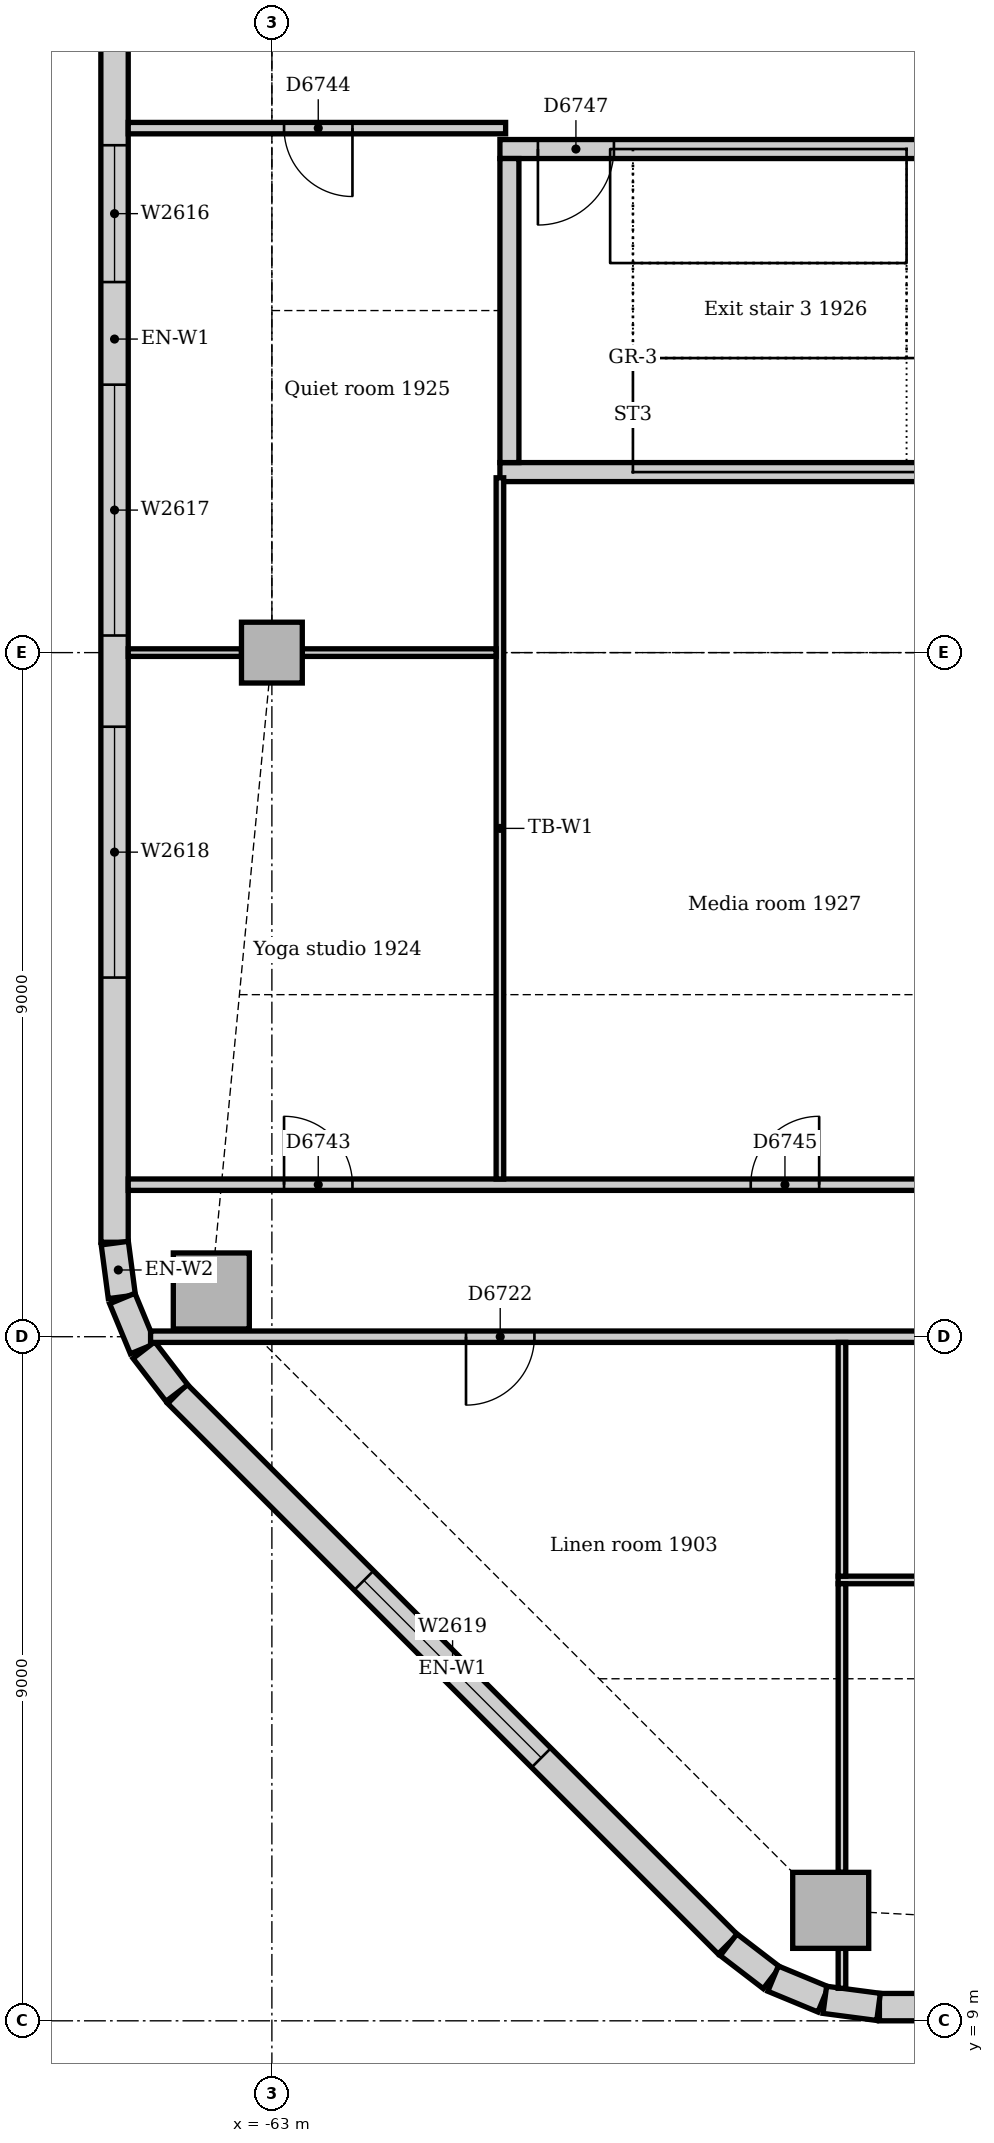
"""IFC4 building model, lengths in metres.
Left out: names, types, materials, properties, quantities, classifications, styles, units other than length and angle.
Written with IfcOpenShell. Run it as: python <this file> out.ifc"""

import sys

from ifc_helpers import new_model, si_unit, direction, frame, frame_2d, origin, origin_2d, place, context, subcontext, project, spatial, rectangle, extrude, element, fill, save


model = new_model("IFC4")
c1 = context("Model", 3, precision=1e-05, world=origin(), true_north=direction((0.0, 1.0)))
c2 = subcontext(c1, "Body", "Model", "MODEL_VIEW")
j1 = project(units=[si_unit("LENGTHUNIT", "METRE"), si_unit("PLANEANGLEUNIT", "RADIAN")], contexts=[c1])
p1 = place(None, origin())
s1 = spatial("IfcSite", under=j1, at=p1, CompositionType="ELEMENT")
p2 = place(p1, origin())
s2 = spatial("IfcBuilding", under=s1, at=p2, CompositionType="ELEMENT")
p3 = place(p2, frame((0.0, 0.0, 83.0)))
s3 = spatial("IfcBuildingStorey", under=s2, at=p3, CompositionType="ELEMENT", Elevation=83.0)
p4 = place(p3, frame((-60.0, 29.375, 0.0), z_axis=(0.0, 0.0, 1.0), x_axis=(1.0, 0.0, 0.0)))
e1 = element("IfcWall", 1, at=p4, inside=s3, PredefinedType="SOLIDWALL", context=c2, shape_type="SweptSolid", body=[
    extrude(rectangle(XDim=7.5, YDim=0.25, at=frame_2d((3.75, 0.0))), origin(), (0.0, 0.0, 1.0), 4.0),
])
p5 = place(p3, frame((-52.5, 33.625, 0.0), z_axis=(0.0, 0.0, 1.0), x_axis=(-1.0, 0.0, 0.0)))
e2 = element("IfcWall", 2, at=p5, inside=s3, PredefinedType="SOLIDWALL", context=c2, shape_type="SweptSolid", body=[
    extrude(rectangle(XDim=7.5, YDim=0.25, at=frame_2d((3.75, 0.0))), origin(), (0.0, 0.0, 1.0), 4.0),
])
p6 = place(p5, frame((6.0, 0.0, 0.0)))
e3 = element("IfcOpeningElement", 3, at=p6, cuts=e2, PredefinedType="OPENING", context=c2, shape_type="SweptSolid", body=[
    extrude(rectangle(XDim=1.0, YDim=2.1, at=frame_2d((0.5, 1.05))), frame((0.0, 0.135, 0.0), z_axis=(0.0, -1.0, 0.0), x_axis=(1.0, 0.0, 0.0)), (0.0, 0.0, 1.0), 0.27),
])
p7 = place(p3, frame((-59.875, 33.5, 0.0), z_axis=(0.0, 0.0, 1.0), x_axis=(0.0, -1.0, 0.0)))
e4 = element("IfcWall", 4, at=p7, inside=s3, PredefinedType="SOLIDWALL", context=c2, shape_type="SweptSolid", body=[
    extrude(rectangle(XDim=4.0, YDim=0.25, at=frame_2d((2.0, 0.0))), origin(), (0.0, 0.0, 1.0), 4.0),
])
for number, where, z_axis, x_axis in (
    (5, (-55.648, 10.453, 0.0), (0.0, 0.0, 1.0), (1.0, 0.0, 0.0)),
    (6, (-63.797, 18.602, 0.0), (0.0, 0.0, 1.0), (1.0, 0.0, 0.0)),
):
    element("IfcColumn", number, at=place(p3, frame(where, z_axis=z_axis, x_axis=x_axis)), inside=s3, PredefinedType="COLUMN", context=c2, shape_type="SweptSolid", body=[
        extrude(rectangle(XDim=1.0, YDim=1.0, at=origin_2d()), origin(), (0.0, 0.0, 1.0), 3.85),
    ])
p8 = place(p3, frame((-63.0, 27.0, 0.0), z_axis=(0.0, 0.0, 1.0), x_axis=(1.0, 0.0, 0.0)))
e7 = element("IfcColumn", 7, at=p8, inside=s3, PredefinedType="COLUMN", context=c2, shape_type="SweptSolid", body=[
    extrude(rectangle(XDim=0.8, YDim=0.8, at=origin_2d()), origin(), (0.0, 0.0, 1.0), 3.85),
])
p9 = place(p3, frame((-55.007, 9.18, 0.0), z_axis=(0.0, 0.0, 1.0), x_axis=(1.0, 0.0, 0.0)))
e8 = element("IfcWall", 8, at=p9, inside=s3, PredefinedType="STANDARD", context=c2, shape_type="SweptSolid", body=[
    extrude(rectangle(XDim=23.765, YDim=0.36, at=frame_2d((11.882, 0.0))), origin(), (0.0, 0.0, 1.0), 3.85),
])
p10 = place(p9, frame((3.482, 0.0, 0.9)))
e9 = element("IfcOpeningElement", 9, at=p10, cuts=e8, PredefinedType="OPENING", context=c2, shape_type="SweptSolid", body=[
    extrude(rectangle(XDim=3.3, YDim=1.6, at=frame_2d((1.65, 0.8))), frame((0.0, 0.19, 0.0), z_axis=(0.0, -1.0, 0.0), x_axis=(1.0, 0.0, 0.0)), (0.0, 0.0, 1.0), 0.38),
])
p11 = place(p9, frame((7.982, 0.0, 0.9)))
e10 = element("IfcOpeningElement", 10, at=p11, cuts=e8, PredefinedType="OPENING", context=c2, shape_type="SweptSolid", body=[
    extrude(rectangle(XDim=3.3, YDim=1.6, at=frame_2d((1.65, 0.8))), frame((0.0, 0.19, 0.0), z_axis=(0.0, -1.0, 0.0), x_axis=(1.0, 0.0, 0.0)), (0.0, 0.0, 1.0), 0.38),
])
p12 = place(p9, frame((12.482, 0.0, 0.9)))
e11 = element("IfcOpeningElement", 11, at=p12, cuts=e8, PredefinedType="OPENING", context=c2, shape_type="SweptSolid", body=[
    extrude(rectangle(XDim=3.3, YDim=1.6, at=frame_2d((1.65, 0.8))), frame((0.0, 0.19, 0.0), z_axis=(0.0, -1.0, 0.0), x_axis=(1.0, 0.0, 0.0)), (0.0, 0.0, 1.0), 0.38),
])
p13 = place(p9, frame((17.732, 0.0, 0.9)))
e12 = element("IfcOpeningElement", 12, at=p13, cuts=e8, PredefinedType="OPENING", context=c2, shape_type="SweptSolid", body=[
    extrude(rectangle(XDim=3.3, YDim=1.6, at=frame_2d((1.65, 0.8))), frame((0.0, 0.19, 0.0), z_axis=(0.0, -1.0, 0.0), x_axis=(1.0, 0.0, 0.0)), (0.0, 0.0, 1.0), 0.38),
])
p14 = place(p3, frame((-65.07, 43.007, 0.0), z_axis=(0.0, 0.0, 1.0), x_axis=(0.0, -1.0, 0.0)))
e13 = element("IfcWall", 13, at=p14, inside=s3, PredefinedType="STANDARD", context=c2, shape_type="SweptSolid", body=[
    extrude(rectangle(XDim=23.765, YDim=0.36, at=frame_2d((11.882, 0.0))), origin(), (0.0, 0.0, 1.0), 3.85),
])
p15 = place(p14, frame((4.232, 0.0, 0.9)))
e14 = element("IfcOpeningElement", 14, at=p15, cuts=e13, PredefinedType="OPENING", context=c2, shape_type="SweptSolid", body=[
    extrude(rectangle(XDim=1.8, YDim=1.6, at=frame_2d((0.9, 0.8))), frame((0.0, 0.19, 0.0), z_axis=(0.0, -1.0, 0.0), x_axis=(1.0, 0.0, 0.0)), (0.0, 0.0, 1.0), 0.38),
])
p16 = place(p14, frame((9.332, 0.0, 0.9)))
e15 = element("IfcOpeningElement", 15, at=p16, cuts=e13, PredefinedType="OPENING", context=c2, shape_type="SweptSolid", body=[
    extrude(rectangle(XDim=1.8, YDim=1.6, at=frame_2d((0.9, 0.8))), frame((0.0, 0.19, 0.0), z_axis=(0.0, -1.0, 0.0), x_axis=(1.0, 0.0, 0.0)), (0.0, 0.0, 1.0), 0.38),
])
p17 = place(p14, frame((12.482, 0.0, 0.9)))
e16 = element("IfcOpeningElement", 16, at=p17, cuts=e13, PredefinedType="OPENING", context=c2, shape_type="SweptSolid", body=[
    extrude(rectangle(XDim=3.3, YDim=1.6, at=frame_2d((1.65, 0.8))), frame((0.0, 0.19, 0.0), z_axis=(0.0, -1.0, 0.0), x_axis=(1.0, 0.0, 0.0)), (0.0, 0.0, 1.0), 0.38),
])
p18 = place(p14, frame((16.982, 0.0, 0.9)))
e17 = element("IfcOpeningElement", 17, at=p18, cuts=e13, PredefinedType="OPENING", context=c2, shape_type="SweptSolid", body=[
    extrude(rectangle(XDim=3.3, YDim=1.6, at=frame_2d((1.65, 0.8))), frame((0.0, 0.19, 0.0), z_axis=(0.0, -1.0, 0.0), x_axis=(1.0, 0.0, 0.0)), (0.0, 0.0, 1.0), 0.38),
])
p19 = place(p3, frame((-64.244, 17.249, 0.0), z_axis=(0.0, 0.0, 1.0), x_axis=(0.707106781187, -0.707106781187, 0.0)))
e18 = element("IfcWall", 18, at=p19, inside=s3, PredefinedType="STANDARD", context=c2, shape_type="SweptSolid", body=[
    extrude(rectangle(XDim=10.243, YDim=0.36, at=frame_2d((5.121, 0.0))), origin(), (0.0, 0.0, 1.0), 3.85),
])
p20 = place(p19, frame((3.471, 0.0, 0.9)))
e19 = element("IfcOpeningElement", 19, at=p20, cuts=e18, PredefinedType="OPENING", context=c2, shape_type="SweptSolid", body=[
    extrude(rectangle(XDim=3.3, YDim=1.6, at=frame_2d((1.65, 0.8))), frame((0.0, 0.19, 0.0), z_axis=(0.0, -1.0, 0.0), x_axis=(1.0, 0.0, 0.0)), (0.0, 0.0, 1.0), 0.38),
])
for number, where, z_axis, x_axis in (
    (20, (-65.067, 19.231, 0.0), (0.0, 0.0, 1.0), (0.131, -0.991, 0.0)),
    (21, (-64.968, 18.503, 0.0), (0.0, 0.0, 1.0), (0.383, -0.924, 0.0)),
):
    element("IfcWall", number, at=place(p3, frame(where, z_axis=z_axis, x_axis=x_axis)), inside=s3, PredefinedType="STANDARD", context=c2, shape_type="SweptSolid", body=[
        extrude(rectangle(XDim=0.713, YDim=0.36, at=frame_2d((0.356, 0.0))), origin(), (0.0, 0.0, 1.0), 3.85),
    ])
for number, where, z_axis, x_axis in (
    (22, (-64.684, 17.825, 0.0), (0.0, 0.0, 1.0), (0.609, -0.793, 0.0)),
    (23, (-56.991, 10.0, 0.0), (0.0, 0.0, 1.0), (0.793, -0.609, 0.0)),
):
    element("IfcWall", number, at=place(p3, frame(where, z_axis=z_axis, x_axis=x_axis)), inside=s3, PredefinedType="STANDARD", context=c2, shape_type="SweptSolid", body=[
        extrude(rectangle(XDim=0.713, YDim=0.36, at=frame_2d((0.357, 0.0))), origin(), (0.0, 0.0, 1.0), 3.85),
    ])
for number, where, z_axis, x_axis in (
    (24, (-56.406, 9.555, 0.0), (0.0, 0.0, 1.0), (0.924, -0.383, 0.0)),
    (25, (-55.726, 9.276, 0.0), (0.0, 0.0, 1.0), (0.991, -0.131, 0.0)),
):
    element("IfcWall", number, at=place(p3, frame(where, z_axis=z_axis, x_axis=x_axis)), inside=s3, PredefinedType="STANDARD", context=c2, shape_type="SweptSolid", body=[
        extrude(rectangle(XDim=0.713, YDim=0.36, at=frame_2d((0.356, 0.0))), origin(), (0.0, 0.0, 1.0), 3.85),
    ])
p21 = place(p3, frame((-64.596, 18.0, 0.0), z_axis=(0.0, 0.0, 1.0), x_axis=(1.0, 0.0, 0.0)))
e26 = element("IfcWall", 26, at=p21, inside=s3, PredefinedType="PARTITIONING", context=c2, shape_type="SweptSolid", body=[
    extrude(rectangle(XDim=10.246, YDim=0.15, at=frame_2d((5.123, 0.0))), origin(), (0.0, 0.0, 1.0), 3.158),
])
p22 = place(p21, frame((4.15, 0.0, 0.0)))
e27 = element("IfcOpeningElement", 27, at=p22, cuts=e26, PredefinedType="OPENING", context=c2, shape_type="SweptSolid", body=[
    extrude(rectangle(XDim=0.9, YDim=2.1, at=frame_2d((0.45, 1.05))), frame((0.0, 0.085, 0.0), z_axis=(0.0, -1.0, 0.0), x_axis=(1.0, 0.0, 0.0)), (0.0, 0.0, 1.0), 0.17),
])
p23 = place(p3, frame((-64.89, 20.0, 0.0), z_axis=(0.0, 0.0, 1.0), x_axis=(1.0, 0.0, 0.0)))
e28 = element("IfcWall", 28, at=p23, inside=s3, PredefinedType="PARTITIONING", context=c2, shape_type="SweptSolid", body=[
    extrude(rectangle(XDim=19.965, YDim=0.15, at=frame_2d((9.982, 0.0))), origin(), (0.0, 0.0, 1.0), 3.85),
])
p24 = place(p23, frame((2.05, 0.0, 0.0)))
e29 = element("IfcOpeningElement", 29, at=p24, cuts=e28, PredefinedType="OPENING", context=c2, shape_type="SweptSolid", body=[
    extrude(rectangle(XDim=0.9, YDim=2.1, at=frame_2d((0.45, 1.05))), frame((0.0, 0.085, 0.0), z_axis=(0.0, -1.0, 0.0), x_axis=(1.0, 0.0, 0.0)), (0.0, 0.0, 1.0), 0.17),
])
p25 = place(p23, frame((8.19, 0.0, 0.0)))
e30 = element("IfcOpeningElement", 30, at=p25, cuts=e28, PredefinedType="OPENING", context=c2, shape_type="SweptSolid", body=[
    extrude(rectangle(XDim=0.9, YDim=2.1, at=frame_2d((0.45, 1.05))), frame((0.0, 0.085, 0.0), z_axis=(0.0, -1.0, 0.0), x_axis=(1.0, 0.0, 0.0)), (0.0, 0.0, 1.0), 0.17),
])
p26 = place(p3, frame((-64.89, 33.9, 0.0), z_axis=(0.0, 0.0, 1.0), x_axis=(1.0, 0.0, 0.0)))
e31 = element("IfcWall", 31, at=p26, inside=s3, PredefinedType="PARTITIONING", context=c2, shape_type="SweptSolid", body=[
    extrude(rectangle(XDim=4.965, YDim=0.15, at=frame_2d((2.482, 0.0))), origin(), (0.0, 0.0, 1.0), 3.85),
])
p27 = place(p26, frame((2.05, 0.0, 0.0)))
e32 = element("IfcOpeningElement", 32, at=p27, cuts=e31, PredefinedType="OPENING", context=c2, shape_type="SweptSolid", body=[
    extrude(rectangle(XDim=0.9, YDim=2.1, at=frame_2d((0.45, 1.05))), frame((0.0, 0.085, 0.0), z_axis=(0.0, -1.0, 0.0), x_axis=(1.0, 0.0, 0.0)), (0.0, 0.0, 1.0), 0.17),
])
p28 = place(p3, frame((-55.55, 14.8, 0.0), z_axis=(0.0, 0.0, 1.0), x_axis=(1.0, 0.0, 0.0)))
e33 = element("IfcWall", 33, at=p28, inside=s3, PredefinedType="PARTITIONING", context=c2, shape_type="SweptSolid", body=[
    extrude(rectangle(XDim=17.975, YDim=0.1, at=frame_2d((8.988, 0.0))), origin(), (0.0, 0.0, 1.0), 3.85),
])
p29 = place(p28, frame((7.18, 0.0, 0.0)))
e34 = element("IfcOpeningElement", 34, at=p29, cuts=e33, PredefinedType="OPENING", context=c2, shape_type="SweptSolid", body=[
    extrude(rectangle(XDim=0.9, YDim=2.1, at=frame_2d((0.45, 1.05))), frame((0.0, 0.06, 0.0), z_axis=(0.0, -1.0, 0.0), x_axis=(1.0, 0.0, 0.0)), (0.0, 0.0, 1.0), 0.12),
])
p30 = place(p3, frame((-60.0, 20.075, 0.0), z_axis=(0.0, 0.0, 1.0), x_axis=(0.0, 1.0, 0.0)))
e35 = element("IfcWall", 35, at=p30, inside=s3, PredefinedType="PARTITIONING", context=c2, shape_type="SweptSolid", body=[
    extrude(rectangle(XDim=9.225, YDim=0.1, at=frame_2d((4.612, 0.0))), origin(), (0.0, 0.0, 1.0), 3.85),
])
p31 = place(p3, frame((-55.5, 14.85, 0.0), z_axis=(0.0, 0.0, 1.0), x_axis=(0.0, 1.0, 0.0)))
e36 = element("IfcWall", 36, at=p31, inside=s3, PredefinedType="PARTITIONING", context=c2, shape_type="SweptSolid", body=[
    extrude(rectangle(XDim=3.075, YDim=0.1, at=frame_2d((1.538, 0.0))), origin(), (0.0, 0.0, 1.0), 3.85),
])
p32 = place(p3, frame((-55.5, 10.953, 0.0), z_axis=(0.0, 0.0, 1.0), x_axis=(0.0, 1.0, 0.0)))
e37 = element("IfcWall", 37, at=p32, inside=s3, PredefinedType="PARTITIONING", context=c2, shape_type="SweptSolid", body=[
    extrude(rectangle(XDim=3.797, YDim=0.1, at=frame_2d((1.898, 0.0))), origin(), (0.0, 0.0, 1.0), 3.85),
])
p33 = place(p3, frame((-55.5, 9.428, 0.0), z_axis=(0.0, 0.0, 1.0), x_axis=(0.0, 1.0, 0.0)))
e38 = element("IfcWall", 38, at=p33, inside=s3, PredefinedType="PARTITIONING", context=c2, shape_type="SweptSolid", body=[
    extrude(rectangle(XDim=0.525, YDim=0.1, at=frame_2d((0.263, 0.0))), origin(), (0.0, 0.0, 1.0), 3.85),
])
p34 = place(p3, frame((-62.6, 27.0, 0.0), z_axis=(0.0, 0.0, 1.0), x_axis=(1.0, 0.0, 0.0)))
e39 = element("IfcWall", 39, at=p34, inside=s3, PredefinedType="PARTITIONING", context=c2, shape_type="SweptSolid", body=[
    extrude(rectangle(XDim=2.55, YDim=0.1, at=frame_2d((1.275, 0.0))), origin(), (0.0, 0.0, 1.0), 3.158),
])
p35 = place(p3, frame((-64.89, 27.0, 0.0), z_axis=(0.0, 0.0, 1.0), x_axis=(1.0, 0.0, 0.0)))
e40 = element("IfcWall", 40, at=p35, inside=s3, PredefinedType="PARTITIONING", context=c2, shape_type="SweptSolid", body=[
    extrude(rectangle(XDim=1.49, YDim=0.1, at=frame_2d((0.745, 0.0))), origin(), (0.0, 0.0, 1.0), 3.85),
])
p36 = place(p16, origin())
e41 = element("IfcWindow", 41, at=p36, inside=s3, PartitioningType="SINGLE_PANEL", PredefinedType="WINDOW", context=c2, shape_type="SweptSolid", body=[
    extrude(rectangle(XDim=1.8, YDim=1.6, at=frame_2d((0.9, 0.8))), frame((0.0, 0.13, 0.0), z_axis=(0.0, -1.0, 0.0), x_axis=(1.0, 0.0, 0.0)), (0.0, 0.0, 1.0), 0.06),
])
fill(e15, e41)
p37 = place(p17, origin())
e42 = element("IfcWindow", 42, at=p37, inside=s3, PartitioningType="SINGLE_PANEL", PredefinedType="WINDOW", context=c2, shape_type="SweptSolid", body=[
    extrude(rectangle(XDim=3.3, YDim=1.6, at=frame_2d((1.65, 0.8))), frame((0.0, 0.13, 0.0), z_axis=(0.0, -1.0, 0.0), x_axis=(1.0, 0.0, 0.0)), (0.0, 0.0, 1.0), 0.06),
])
fill(e16, e42)
p38 = place(p18, origin())
e43 = element("IfcWindow", 43, at=p38, inside=s3, PartitioningType="SINGLE_PANEL", PredefinedType="WINDOW", context=c2, shape_type="SweptSolid", body=[
    extrude(rectangle(XDim=3.3, YDim=1.6, at=frame_2d((1.65, 0.8))), frame((0.0, 0.13, 0.0), z_axis=(0.0, -1.0, 0.0), x_axis=(1.0, 0.0, 0.0)), (0.0, 0.0, 1.0), 0.06),
])
fill(e17, e43)
p39 = place(p20, origin())
e44 = element("IfcWindow", 44, at=p39, inside=s3, PartitioningType="SINGLE_PANEL", PredefinedType="WINDOW", context=c2, shape_type="SweptSolid", body=[
    extrude(rectangle(XDim=3.3, YDim=1.6, at=frame_2d((1.65, 0.8))), frame((0.0, 0.13, 0.0), z_axis=(0.0, -1.0, 0.0), x_axis=(1.0, 0.0, 0.0)), (0.0, 0.0, 1.0), 0.06),
])
fill(e19, e44)
p40 = place(p22, frame((0.9, 0.0, 0.0), z_axis=(0.0, 0.0, 1.0), x_axis=(-1.0, 0.0, 0.0)))
e45 = element("IfcDoor", 45, at=p40, inside=s3, OperationType="SINGLE_SWING_RIGHT", PredefinedType="DOOR", context=c2, shape_type="SweptSolid", body=[
    extrude(rectangle(XDim=0.9, YDim=2.1, at=frame_2d((0.45, 1.05))), frame((0.0, 0.025, 0.0), z_axis=(0.0, -1.0, 0.0), x_axis=(1.0, 0.0, 0.0)), (0.0, 0.0, 1.0), 0.05),
])
fill(e27, e45)
p41 = place(p24, origin())
e46 = element("IfcDoor", 46, at=p41, inside=s3, OperationType="SINGLE_SWING_LEFT", PredefinedType="DOOR", context=c2, shape_type="SweptSolid", body=[
    extrude(rectangle(XDim=0.9, YDim=2.1, at=frame_2d((0.45, 1.05))), frame((0.0, 0.025, 0.0), z_axis=(0.0, -1.0, 0.0), x_axis=(1.0, 0.0, 0.0)), (0.0, 0.0, 1.0), 0.05),
])
fill(e29, e46)
p42 = place(p27, frame((0.9, 0.0, 0.0), z_axis=(0.0, 0.0, 1.0), x_axis=(-1.0, 0.0, 0.0)))
e47 = element("IfcDoor", 47, at=p42, inside=s3, OperationType="SINGLE_SWING_LEFT", PredefinedType="DOOR", context=c2, shape_type="SweptSolid", body=[
    extrude(rectangle(XDim=0.9, YDim=2.1, at=frame_2d((0.45, 1.05))), frame((0.0, 0.025, 0.0), z_axis=(0.0, -1.0, 0.0), x_axis=(1.0, 0.0, 0.0)), (0.0, 0.0, 1.0), 0.05),
])
fill(e32, e47)
p43 = place(p25, origin())
e48 = element("IfcDoor", 48, at=p43, inside=s3, OperationType="SINGLE_SWING_RIGHT", PredefinedType="DOOR", context=c2, shape_type="SweptSolid", body=[
    extrude(rectangle(XDim=0.9, YDim=2.1, at=frame_2d((0.45, 1.05))), frame((0.0, 0.025, 0.0), z_axis=(0.0, -1.0, 0.0), x_axis=(1.0, 0.0, 0.0)), (0.0, 0.0, 1.0), 0.05),
])
fill(e30, e48)
p44 = place(p6, origin())
e49 = element("IfcDoor", 49, at=p44, inside=s3, OperationType="SINGLE_SWING_RIGHT", PredefinedType="DOOR", context=c2, shape_type="SweptSolid", body=[
    extrude(rectangle(XDim=1.0, YDim=2.1, at=frame_2d((0.5, 1.05))), frame((0.0, 0.025, 0.0), z_axis=(0.0, -1.0, 0.0), x_axis=(1.0, 0.0, 0.0)), (0.0, 0.0, 1.0), 0.05),
])
fill(e3, e49)
save(model, sys.argv[1])
